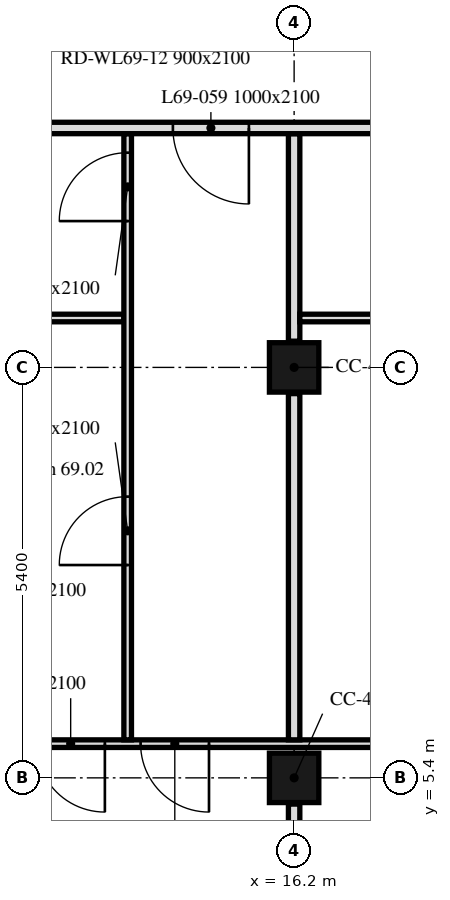
"""IFC4 building model, lengths in metres.
Left out: names, types, materials, properties, quantities, classifications, styles, units other than length and angle.
Written with IfcOpenShell. Run it as: python <this file> out.ifc"""

import sys

from ifc_helpers import new_model, si_unit, direction, frame, frame_2d, origin, origin_2d, place, context, subcontext, project, spatial, rectangle, extrude, element, fill, save


model = new_model("IFC4")
c1 = context("Model", 3, precision=1e-05, world=origin(), true_north=direction((0.0, 1.0)))
c2 = subcontext(c1, "Body", "Model", "MODEL_VIEW")
j1 = project(units=[si_unit("LENGTHUNIT", "METRE"), si_unit("PLANEANGLEUNIT", "RADIAN")], contexts=[c1])
p1 = place(None, origin())
s1 = spatial("IfcSite", under=j1, at=p1, CompositionType="ELEMENT")
p2 = place(p1, origin())
s2 = spatial("IfcBuilding", under=s1, at=p2, CompositionType="ELEMENT")
p3 = place(p2, frame((0.0, 0.0, 281.8)))
s3 = spatial("IfcBuildingStorey", under=s2, at=p3, CompositionType="ELEMENT", Elevation=281.8)
for number, where, z_axis, x_axis in (
    (1, (16.2, 5.4, 0.0), (0.0, 0.0, 1.0), (1.0, 0.0, 0.0)),
    (2, (16.2, 10.8, 0.0), (0.0, 0.0, 1.0), (1.0, 0.0, 0.0)),
):
    element("IfcColumn", number, at=place(p3, frame(where, z_axis=z_axis, x_axis=x_axis)), inside=s3, PredefinedType="COLUMN", context=c2, shape_type="SweptSolid", body=[
        extrude(rectangle(XDim=0.65, YDim=0.65, at=origin_2d()), origin(), (0.0, 0.0, 1.0), 3.0),
    ])
p4 = place(p3, frame((37.652, 5.85, 0.0), z_axis=(0.0, 0.0, 1.0), x_axis=(-1.0, 0.0, 0.0)))
e3 = element("IfcWall", 3, at=p4, inside=s3, PredefinedType="PARTITIONING", context=c2, shape_type="SweptSolid", body=[
    extrude(rectangle(XDim=31.501, YDim=0.1, at=frame_2d((15.75, 0.0))), origin(), (0.0, 0.0, 1.0), 2.4),
])
p5 = place(p4, frame((12.923, 0.0, 0.0)))
e4 = element("IfcOpeningElement", 4, at=p5, cuts=e3, PredefinedType="OPENING", context=c2, shape_type="SweptSolid", body=[
    extrude(rectangle(XDim=0.9, YDim=2.1, at=frame_2d((0.45, 1.05))), frame((0.0, 0.05, 0.0), z_axis=(0.0, -1.0, 0.0), x_axis=(1.0, 0.0, 0.0)), (0.0, 0.0, 1.0), 0.1),
])
p6 = place(p4, frame((29.422, 0.0, 0.0)))
e5 = element("IfcOpeningElement", 5, at=p6, cuts=e3, PredefinedType="OPENING", context=c2, shape_type="SweptSolid", body=[
    extrude(rectangle(XDim=0.9, YDim=2.1, at=frame_2d((0.45, 1.05))), frame((0.0, 0.05, 0.0), z_axis=(0.0, -1.0, 0.0), x_axis=(1.0, 0.0, 0.0)), (0.0, 0.0, 1.0), 0.1),
])
p7 = place(p4, frame((28.182, 0.0, 0.0)))
e6 = element("IfcOpeningElement", 6, at=p7, cuts=e3, PredefinedType="OPENING", context=c2, shape_type="SweptSolid", body=[
    extrude(rectangle(XDim=0.9, YDim=2.1, at=frame_2d((0.45, 1.05))), frame((0.0, 0.05, 0.0), z_axis=(0.0, -1.0, 0.0), x_axis=(1.0, 0.0, 0.0)), (0.0, 0.0, 1.0), 0.1),
])
p8 = place(p4, frame((23.942, 0.0, 0.0)))
e7 = element("IfcOpeningElement", 7, at=p8, cuts=e3, PredefinedType="OPENING", context=c2, shape_type="SweptSolid", body=[
    extrude(rectangle(XDim=0.9, YDim=2.1, at=frame_2d((0.45, 1.05))), frame((0.0, 0.05, 0.0), z_axis=(0.0, -1.0, 0.0), x_axis=(1.0, 0.0, 0.0)), (0.0, 0.0, 1.0), 0.1),
])
p9 = place(p4, frame((22.572, 0.0, 0.0)))
e8 = element("IfcOpeningElement", 8, at=p9, cuts=e3, PredefinedType="OPENING", context=c2, shape_type="SweptSolid", body=[
    extrude(rectangle(XDim=0.9, YDim=2.1, at=frame_2d((0.45, 1.05))), frame((0.0, 0.05, 0.0), z_axis=(0.0, -1.0, 0.0), x_axis=(1.0, 0.0, 0.0)), (0.0, 0.0, 1.0), 0.1),
])
p10 = place(p4, frame((19.466, 0.0, 0.0)))
e9 = element("IfcOpeningElement", 9, at=p10, cuts=e3, PredefinedType="OPENING", context=c2, shape_type="SweptSolid", body=[
    extrude(rectangle(XDim=0.9, YDim=2.1, at=frame_2d((0.45, 1.05))), frame((0.0, 0.05, 0.0), z_axis=(0.0, -1.0, 0.0), x_axis=(1.0, 0.0, 0.0)), (0.0, 0.0, 1.0), 0.1),
])
p11 = place(p4, frame((9.19, 0.0, 0.0)))
e10 = element("IfcOpeningElement", 10, at=p11, cuts=e3, PredefinedType="OPENING", context=c2, shape_type="SweptSolid", body=[
    extrude(rectangle(XDim=0.9, YDim=2.1, at=frame_2d((0.45, 1.05))), frame((0.0, 0.05, 0.0), z_axis=(0.0, -1.0, 0.0), x_axis=(1.0, 0.0, 0.0)), (0.0, 0.0, 1.0), 0.1),
])
p12 = place(p4, frame((7.512, 0.0, 0.0)))
e11 = element("IfcOpeningElement", 11, at=p12, cuts=e3, PredefinedType="OPENING", context=c2, shape_type="SweptSolid", body=[
    extrude(rectangle(XDim=0.9, YDim=2.1, at=frame_2d((0.45, 1.05))), frame((0.0, 0.05, 0.0), z_axis=(0.0, -1.0, 0.0), x_axis=(1.0, 0.0, 0.0)), (0.0, 0.0, 1.0), 0.1),
])
p13 = place(p4, frame((2.952, 0.0, 0.0)))
e12 = element("IfcOpeningElement", 12, at=p13, cuts=e3, PredefinedType="OPENING", context=c2, shape_type="SweptSolid", body=[
    extrude(rectangle(XDim=0.9, YDim=2.1, at=frame_2d((0.45, 1.05))), frame((0.0, 0.05, 0.0), z_axis=(0.0, -1.0, 0.0), x_axis=(1.0, 0.0, 0.0)), (0.0, 0.0, 1.0), 0.1),
])
p14 = place(p4, frame((18.096, 0.0, 0.0)))
e13 = element("IfcOpeningElement", 13, at=p14, cuts=e3, PredefinedType="OPENING", context=c2, shape_type="SweptSolid", body=[
    extrude(rectangle(XDim=0.9, YDim=2.1, at=frame_2d((0.45, 1.05))), frame((0.0, 0.05, 0.0), z_axis=(0.0, -1.0, 0.0), x_axis=(1.0, 0.0, 0.0)), (0.0, 0.0, 1.0), 0.1),
])
p15 = place(p3, frame((16.2, 0.751, 0.0), z_axis=(0.0, 0.0, 1.0), x_axis=(0.0, 1.0, 0.0)))
e14 = element("IfcWall", 14, at=p15, inside=s3, PredefinedType="PARTITIONING", context=c2, shape_type="SweptSolid", body=[
    extrude(rectangle(XDim=4.304, YDim=0.15, at=frame_2d((2.152, 0.0))), origin(), (0.0, 0.0, 1.0), 2.4),
])
p16 = place(p3, frame((13.96, 11.45, 0.0), z_axis=(0.0, 0.0, 1.0), x_axis=(-1.0, 0.0, 0.0)))
e15 = element("IfcWall", 15, at=p16, inside=s3, PredefinedType="PARTITIONING", context=c2, shape_type="SweptSolid", body=[
    extrude(rectangle(XDim=3.085, YDim=0.1, at=frame_2d((1.542, 0.0))), origin(), (0.0, 0.0, 1.0), 3.0),
])
p17 = place(p3, frame((14.01, 5.9, 0.0), z_axis=(0.0, 0.0, 1.0), x_axis=(0.0, 1.0, 0.0)))
e16 = element("IfcWall", 16, at=p17, inside=s3, PredefinedType="PARTITIONING", context=c2, shape_type="SweptSolid", body=[
    extrude(rectangle(XDim=7.975, YDim=0.1, at=frame_2d((3.988, 0.0))), origin(), (0.0, 0.0, 1.0), 3.0),
])
p18 = place(p17, frame((6.825, 0.0, 0.0)))
e17 = element("IfcOpeningElement", 17, at=p18, cuts=e16, PredefinedType="OPENING", context=c2, shape_type="SweptSolid", body=[
    extrude(rectangle(XDim=0.9, YDim=2.1, at=frame_2d((0.45, 1.05))), frame((0.0, 0.05, 0.0), z_axis=(0.0, -1.0, 0.0), x_axis=(1.0, 0.0, 0.0)), (0.0, 0.0, 1.0), 0.1),
])
p19 = place(p17, frame((2.3, 0.0, 0.0)))
e18 = element("IfcOpeningElement", 18, at=p19, cuts=e16, PredefinedType="OPENING", context=c2, shape_type="SweptSolid", body=[
    extrude(rectangle(XDim=0.9, YDim=2.1, at=frame_2d((0.45, 1.05))), frame((0.0, 0.05, 0.0), z_axis=(0.0, -1.0, 0.0), x_axis=(1.0, 0.0, 0.0)), (0.0, 0.0, 1.0), 0.1),
])
p20 = place(p3, frame((16.2, 5.9, 0.0), z_axis=(0.0, 0.0, 1.0), x_axis=(0.0, 1.0, 0.0)))
e19 = element("IfcWall", 19, at=p20, inside=s3, PredefinedType="PARTITIONING", context=c2, shape_type="SweptSolid", body=[
    extrude(rectangle(XDim=4.555, YDim=0.15, at=frame_2d((2.278, 0.0))), origin(), (0.0, 0.0, 1.0), 2.4),
])
p21 = place(p3, frame((16.2, 11.145, 0.0), z_axis=(0.0, 0.0, 1.0), x_axis=(0.0, 1.0, 0.0)))
e20 = element("IfcWall", 20, at=p21, inside=s3, PredefinedType="PARTITIONING", context=c2, shape_type="SweptSolid", body=[
    extrude(rectangle(XDim=2.73, YDim=0.15, at=frame_2d((1.365, 0.0))), origin(), (0.0, 0.0, 1.0), 2.4),
])
p22 = place(p3, frame((18.306, 11.45, 0.0), z_axis=(0.0, 0.0, 1.0), x_axis=(-1.0, 0.0, 0.0)))
e21 = element("IfcWall", 21, at=p22, inside=s3, PredefinedType="PARTITIONING", context=c2, shape_type="SweptSolid", body=[
    extrude(rectangle(XDim=2.031, YDim=0.1, at=frame_2d((1.016, 0.0))), origin(), (0.0, 0.0, 1.0), 3.0),
])
p23 = place(p3, frame((47.849, 13.95, 0.0), z_axis=(0.0, 0.0, 1.0), x_axis=(-1.0, 0.0, 0.0)))
e22 = element("IfcWall", 22, at=p23, inside=s3, PredefinedType="PARTITIONING", context=c2, shape_type="SweptSolid", body=[
    extrude(rectangle(XDim=41.698, YDim=0.15, at=frame_2d((20.849, 0.0))), origin(), (0.0, 0.0, 1.0), 2.4),
])
p24 = place(p23, frame((37.749, 0.0, 0.0)))
e23 = element("IfcOpeningElement", 23, at=p24, cuts=e22, PredefinedType="OPENING", context=c2, shape_type="SweptSolid", body=[
    extrude(rectangle(XDim=1.0, YDim=2.1, at=frame_2d((0.5, 1.05))), frame((0.0, 0.075, 0.0), z_axis=(0.0, -1.0, 0.0), x_axis=(1.0, 0.0, 0.0)), (0.0, 0.0, 1.0), 0.15),
])
p25 = place(p23, frame((32.244, 0.0, 0.0)))
e24 = element("IfcOpeningElement", 24, at=p25, cuts=e22, PredefinedType="OPENING", context=c2, shape_type="SweptSolid", body=[
    extrude(rectangle(XDim=1.0, YDim=2.1, at=frame_2d((0.5, 1.05))), frame((0.0, 0.075, 0.0), z_axis=(0.0, -1.0, 0.0), x_axis=(1.0, 0.0, 0.0)), (0.0, 0.0, 1.0), 0.15),
])
p26 = place(p23, frame((27.735, 0.0, 0.0)))
e25 = element("IfcOpeningElement", 25, at=p26, cuts=e22, PredefinedType="OPENING", context=c2, shape_type="SweptSolid", body=[
    extrude(rectangle(XDim=1.0, YDim=2.1, at=frame_2d((0.5, 1.05))), frame((0.0, 0.075, 0.0), z_axis=(0.0, -1.0, 0.0), x_axis=(1.0, 0.0, 0.0)), (0.0, 0.0, 1.0), 0.15),
])
p27 = place(p23, frame((8.347, 0.0, 0.0)))
e26 = element("IfcOpeningElement", 26, at=p27, cuts=e22, PredefinedType="OPENING", context=c2, shape_type="SweptSolid", body=[
    extrude(rectangle(XDim=1.0, YDim=2.1, at=frame_2d((0.5, 1.05))), frame((0.0, 0.075, 0.0), z_axis=(0.0, -1.0, 0.0), x_axis=(1.0, 0.0, 0.0)), (0.0, 0.0, 1.0), 0.15),
])
p28 = place(p18, origin())
e27 = element("IfcDoor", 27, at=p28, inside=s3, OperationType="SINGLE_SWING_LEFT", PredefinedType="DOOR", context=c2, shape_type="SweptSolid", body=[
    extrude(rectangle(XDim=0.9, YDim=2.1, at=frame_2d((0.45, 1.05))), frame((0.0, 0.025, 0.0), z_axis=(0.0, -1.0, 0.0), x_axis=(1.0, 0.0, 0.0)), (0.0, 0.0, 1.0), 0.05),
])
fill(e17, e27)
p29 = place(p8, origin())
e28 = element("IfcDoor", 28, at=p29, inside=s3, OperationType="SINGLE_SWING_LEFT", PredefinedType="DOOR", context=c2, shape_type="SweptSolid", body=[
    extrude(rectangle(XDim=0.9, YDim=2.1, at=frame_2d((0.45, 1.05))), frame((0.0, 0.025, 0.0), z_axis=(0.0, -1.0, 0.0), x_axis=(1.0, 0.0, 0.0)), (0.0, 0.0, 1.0), 0.05),
])
fill(e7, e28)
p30 = place(p9, origin())
e29 = element("IfcDoor", 29, at=p30, inside=s3, OperationType="SINGLE_SWING_RIGHT", PredefinedType="DOOR", context=c2, shape_type="SweptSolid", body=[
    extrude(rectangle(XDim=0.9, YDim=2.1, at=frame_2d((0.45, 1.05))), frame((0.0, 0.025, 0.0), z_axis=(0.0, -1.0, 0.0), x_axis=(1.0, 0.0, 0.0)), (0.0, 0.0, 1.0), 0.05),
])
fill(e8, e29)
p31 = place(p19, origin())
e30 = element("IfcDoor", 30, at=p31, inside=s3, OperationType="SINGLE_SWING_RIGHT", PredefinedType="DOOR", context=c2, shape_type="SweptSolid", body=[
    extrude(rectangle(XDim=0.9, YDim=2.1, at=frame_2d((0.45, 1.05))), frame((0.0, 0.025, 0.0), z_axis=(0.0, -1.0, 0.0), x_axis=(1.0, 0.0, 0.0)), (0.0, 0.0, 1.0), 0.05),
])
fill(e18, e30)
p32 = place(p25, origin())
e31 = element("IfcDoor", 31, at=p32, inside=s3, OperationType="SINGLE_SWING_LEFT", PredefinedType="DOOR", context=c2, shape_type="SweptSolid", body=[
    extrude(rectangle(XDim=1.0, YDim=2.1, at=frame_2d((0.5, 1.05))), frame((0.0, 0.025, 0.0), z_axis=(0.0, -1.0, 0.0), x_axis=(1.0, 0.0, 0.0)), (0.0, 0.0, 1.0), 0.05),
])
fill(e24, e31)
save(model, sys.argv[1])
